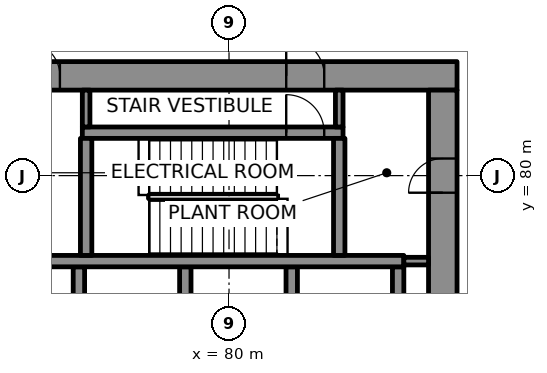
"""IFC4 building model, lengths in metres.
Left out: names, types, materials, properties, quantities, classifications, styles, units other than length and angle.
Written with IfcOpenShell. Run it as: python <this file> out.ifc"""

import sys

from ifc_helpers import new_model, si_unit, direction, frame, frame_2d, origin, place, context, subcontext, project, spatial, rectangle, extrude, element, fill, save


model = new_model("IFC4")
c1 = context("Model", 3, precision=1e-05, world=origin(), true_north=direction((0.0, 1.0)))
c2 = subcontext(c1, "Body", "Model", "MODEL_VIEW")
j1 = project(units=[si_unit("LENGTHUNIT", "METRE"), si_unit("PLANEANGLEUNIT", "RADIAN")], contexts=[c1])
p1 = place(None, origin())
s1 = spatial("IfcSite", under=j1, at=p1, CompositionType="ELEMENT")
p2 = place(p1, origin())
s2 = spatial("IfcBuilding", under=s1, at=p2, CompositionType="ELEMENT")
p3 = place(p2, frame((0.0, 0.0, 146.8)))
s3 = spatial("IfcBuildingStorey", under=s2, at=p3, CompositionType="ELEMENT", Elevation=146.8)
p4 = place(p3, frame((64.0, 82.625, 0.0), z_axis=(0.0, 0.0, 1.0), x_axis=(1.0, 0.0, 0.0)))
e1 = element("IfcWall", 1, at=p4, inside=s3, PredefinedType="SHEAR", context=c2, shape_type="SweptSolid", body=[
    extrude(rectangle(XDim=22.0, YDim=0.75, at=frame_2d((11.0, 0.0))), origin(), (0.0, 0.0, 1.0), 4.05),
])
p5 = place(p4, frame((3.695, 0.0, 0.0)))
e2 = element("IfcOpeningElement", 2, at=p5, cuts=e1, PredefinedType="OPENING", context=c2, shape_type="SweptSolid", body=[
    extrude(rectangle(XDim=1.0, YDim=2.1, at=frame_2d((0.5, 1.05))), frame((0.0, 0.385, 0.0), z_axis=(0.0, -1.0, 0.0), x_axis=(1.0, 0.0, 0.0)), (0.0, 0.0, 1.0), 0.77),
])
p6 = place(p4, frame((17.505, 0.0, 0.0)))
e3 = element("IfcOpeningElement", 3, at=p6, cuts=e1, PredefinedType="OPENING", context=c2, shape_type="SweptSolid", body=[
    extrude(rectangle(XDim=1.0, YDim=2.1, at=frame_2d((0.5, 1.05))), frame((0.0, 0.385, 0.0), z_axis=(0.0, -1.0, 0.0), x_axis=(1.0, 0.0, 0.0)), (0.0, 0.0, 1.0), 0.77),
])
p7 = place(p4, frame((10.65, 0.0, 0.0)))
e4 = element("IfcOpeningElement", 4, at=p7, cuts=e1, PredefinedType="OPENING", context=c2, shape_type="SweptSolid", body=[
    extrude(rectangle(XDim=0.9, YDim=2.1, at=frame_2d((0.45, 1.05))), frame((0.0, 0.385, 0.0), z_axis=(0.0, -1.0, 0.0), x_axis=(1.0, 0.0, 0.0)), (0.0, 0.0, 1.0), 0.77),
])
p8 = place(p3, frame((85.625, 67.75, 0.0), z_axis=(0.0, 0.0, 1.0), x_axis=(0.0, 1.0, 0.0)))
e5 = element("IfcWall", 5, at=p8, inside=s3, PredefinedType="SHEAR", context=c2, shape_type="SweptSolid", body=[
    extrude(rectangle(XDim=14.5, YDim=0.75, at=frame_2d((7.25, 0.0))), origin(), (0.0, 0.0, 1.0), 4.05),
])
p9 = place(p8, frame((4.65, 0.0, 0.0)))
e6 = element("IfcOpeningElement", 6, at=p9, cuts=e5, PredefinedType="OPENING", context=c2, shape_type="SweptSolid", body=[
    extrude(rectangle(XDim=1.8, YDim=2.1, at=frame_2d((0.9, 1.05))), frame((0.0, 0.385, 0.0), z_axis=(0.0, -1.0, 0.0), x_axis=(1.0, 0.0, 0.0)), (0.0, 0.0, 1.0), 0.77),
])
p10 = place(p8, frame((11.8, 0.0, 0.0)))
e7 = element("IfcOpeningElement", 7, at=p10, cuts=e5, PredefinedType="OPENING", context=c2, shape_type="SweptSolid", body=[
    extrude(rectangle(XDim=0.9, YDim=2.1, at=frame_2d((0.45, 1.05))), frame((0.0, 0.385, 0.0), z_axis=(0.0, -1.0, 0.0), x_axis=(1.0, 0.0, 0.0)), (0.0, 0.0, 1.0), 0.77),
])
for number, where, z_axis, x_axis in (
    (8, (76.05, 75.0, 0.0), (0.0, 0.0, 1.0), (0.0, 1.0, 0.0)),
    (9, (78.85, 75.0, 0.0), (0.0, 0.0, 1.0), (0.0, 1.0, 0.0)),
    (10, (81.65, 75.0, 0.0), (0.0, 0.0, 1.0), (0.0, 1.0, 0.0)),
    (11, (84.45, 75.0, 0.0), (0.0, 0.0, 1.0), (0.0, 1.0, 0.0)),
):
    element("IfcWall", number, at=place(p3, frame(where, z_axis=z_axis, x_axis=x_axis)), inside=s3, PredefinedType="SHEAR", context=c2, shape_type="SweptSolid", body=[
        extrude(rectangle(XDim=2.6, YDim=0.3, at=frame_2d((1.3, 0.0))), origin(), (0.0, 0.0, 1.0), 4.05),
    ])
p11 = place(p3, frame((67.15, 77.75, 0.0), z_axis=(0.0, 0.0, 1.0), x_axis=(1.0, 0.0, 0.0)))
e12 = element("IfcWall", 12, at=p11, inside=s3, PredefinedType="SHEAR", context=c2, shape_type="SweptSolid", body=[
    extrude(rectangle(XDim=17.45, YDim=0.3, at=frame_2d((8.725, 0.0))), origin(), (0.0, 0.0, 1.0), 4.05),
])
p12 = place(p11, frame((0.545, 0.0, 0.0)))
e13 = element("IfcOpeningElement", 13, at=p12, cuts=e12, PredefinedType="OPENING", context=c2, shape_type="SweptSolid", body=[
    extrude(rectangle(XDim=1.0, YDim=2.1, at=frame_2d((0.5, 1.05))), frame((0.0, 0.16, 0.0), z_axis=(0.0, -1.0, 0.0), x_axis=(1.0, 0.0, 0.0)), (0.0, 0.0, 1.0), 0.32),
])
p13 = place(p3, frame((76.14, 81.13, 0.0), z_axis=(0.0, 0.0, 1.0), x_axis=(1.0, 0.0, 0.0)))
e14 = element("IfcWall", 14, at=p13, inside=s3, PredefinedType="SHEAR", context=c2, shape_type="SweptSolid", body=[
    extrude(rectangle(XDim=6.86, YDim=0.3, at=frame_2d((3.43, 0.0))), origin(), (0.0, 0.0, 1.0), 4.05),
])
p14 = place(p13, frame((5.365, 0.0, 0.0)))
e15 = element("IfcOpeningElement", 15, at=p14, cuts=e14, PredefinedType="OPENING", context=c2, shape_type="SweptSolid", body=[
    extrude(rectangle(XDim=1.0, YDim=2.1, at=frame_2d((0.5, 1.05))), frame((0.0, 0.16, 0.0), z_axis=(0.0, -1.0, 0.0), x_axis=(1.0, 0.0, 0.0)), (0.0, 0.0, 1.0), 0.32),
])
for number, where, z_axis, x_axis in (
    (16, (76.24, 77.9, 0.0), (0.0, 0.0, 1.0), (0.0, 1.0, 0.0)),
    (17, (82.9, 77.9, 0.0), (0.0, 0.0, 1.0), (0.0, 1.0, 0.0)),
):
    element("IfcWall", number, at=place(p3, frame(where, z_axis=z_axis, x_axis=x_axis)), inside=s3, PredefinedType="SHEAR", context=c2, shape_type="SweptSolid", body=[
        extrude(rectangle(XDim=3.08, YDim=0.3, at=frame_2d((1.54, 0.0))), origin(), (0.0, 0.0, 1.0), 4.05),
    ])
p15 = place(p3, frame((106.254, 61.172, 0.0), z_axis=(0.0, 0.0, 1.0), x_axis=(-0.500000383388, 0.866025182435, 0.0)))
e18 = element("IfcWall", 18, at=p15, inside=s3, PredefinedType="SOLIDWALL", context=c2, shape_type="SweptSolid", body=[
    extrude(rectangle(XDim=55.204, YDim=0.3, at=frame_2d((27.602, 0.0))), origin(), (0.0, 0.0, 1.0), 4.05),
])
p16 = place(p15, frame((16.895, 0.0, 0.8)))
e19 = element("IfcOpeningElement", 19, at=p16, cuts=e18, PredefinedType="OPENING", context=c2, shape_type="SweptSolid", body=[
    extrude(rectangle(XDim=3.0, YDim=2.4, at=frame_2d((1.5, 1.2))), frame((0.0, 0.16, 0.0), z_axis=(0.0, -1.0, 0.0), x_axis=(1.0, 0.0, 0.0)), (0.0, 0.0, 1.0), 0.32),
])
p17 = place(p15, frame((35.309, 0.0, 0.8)))
e20 = element("IfcOpeningElement", 20, at=p17, cuts=e18, PredefinedType="OPENING", context=c2, shape_type="SweptSolid", body=[
    extrude(rectangle(XDim=3.0, YDim=2.4, at=frame_2d((1.5, 1.2))), frame((0.0, 0.16, 0.0), z_axis=(0.0, -1.0, 0.0), x_axis=(1.0, 0.0, 0.0)), (0.0, 0.0, 1.0), 0.32),
])
p18 = place(p3, frame((84.6, 77.75, 0.0), z_axis=(0.0, 0.0, 1.0), x_axis=(1.0, 0.0, 0.0)))
e21 = element("IfcWall", 21, at=p18, inside=s3, PredefinedType="PARTITIONING", context=c2, shape_type="SweptSolid", body=[
    extrude(rectangle(XDim=0.65, YDim=0.2, at=frame_2d((0.325, 0.0))), origin(), (0.0, 0.0, 1.0), 4.05),
])
for number, where, z_axis, x_axis in (
    (22, (76.24, 81.28, 0.0), (0.0, 0.0, 1.0), (0.0, 1.0, 0.0)),
    (23, (82.9, 81.28, 0.0), (0.0, 0.0, 1.0), (0.0, 1.0, 0.0)),
):
    element("IfcWall", number, at=place(p3, frame(where, z_axis=z_axis, x_axis=x_axis)), inside=s3, PredefinedType="PARTITIONING", context=c2, shape_type="SweptSolid", body=[
        extrude(rectangle(XDim=0.97, YDim=0.2, at=frame_2d((0.485, 0.0))), origin(), (0.0, 0.0, 1.0), 4.05),
    ])
p19 = place(p14, origin())
e24 = element("IfcDoor", 24, at=p19, inside=s3, OperationType="SINGLE_SWING_RIGHT", PredefinedType="DOOR", context=c2, shape_type="SweptSolid", body=[
    extrude(rectangle(XDim=1.0, YDim=2.1, at=frame_2d((0.5, 1.05))), frame((0.0, 0.025, 0.0), z_axis=(0.0, -1.0, 0.0), x_axis=(1.0, 0.0, 0.0)), (0.0, 0.0, 1.0), 0.05),
])
fill(e15, e24)
p20 = place(p6, origin())
e25 = element("IfcDoor", 25, at=p20, inside=s3, OperationType="SINGLE_SWING_LEFT", PredefinedType="DOOR", context=c2, shape_type="SweptSolid", body=[
    extrude(rectangle(XDim=1.0, YDim=2.1, at=frame_2d((0.5, 1.05))), frame((0.0, 0.095, 0.0), z_axis=(0.0, -1.0, 0.0), x_axis=(1.0, 0.0, 0.0)), (0.0, 0.0, 1.0), 0.19),
])
fill(e3, e25)
p21 = place(p7, origin())
e26 = element("IfcDoor", 26, at=p21, inside=s3, OperationType="SINGLE_SWING_RIGHT", PredefinedType="DOOR", context=c2, shape_type="SweptSolid", body=[
    extrude(rectangle(XDim=0.9, YDim=2.1, at=frame_2d((0.45, 1.05))), frame((0.0, 0.095, 0.0), z_axis=(0.0, -1.0, 0.0), x_axis=(1.0, 0.0, 0.0)), (0.0, 0.0, 1.0), 0.19),
])
fill(e4, e26)
p22 = place(p10, origin())
e27 = element("IfcDoor", 27, at=p22, inside=s3, OperationType="SINGLE_SWING_LEFT", PredefinedType="DOOR", context=c2, shape_type="SweptSolid", body=[
    extrude(rectangle(XDim=0.9, YDim=2.1, at=frame_2d((0.45, 1.05))), frame((0.0, 0.095, 0.0), z_axis=(0.0, -1.0, 0.0), x_axis=(1.0, 0.0, 0.0)), (0.0, 0.0, 1.0), 0.19),
])
fill(e7, e27)
save(model, sys.argv[1])
